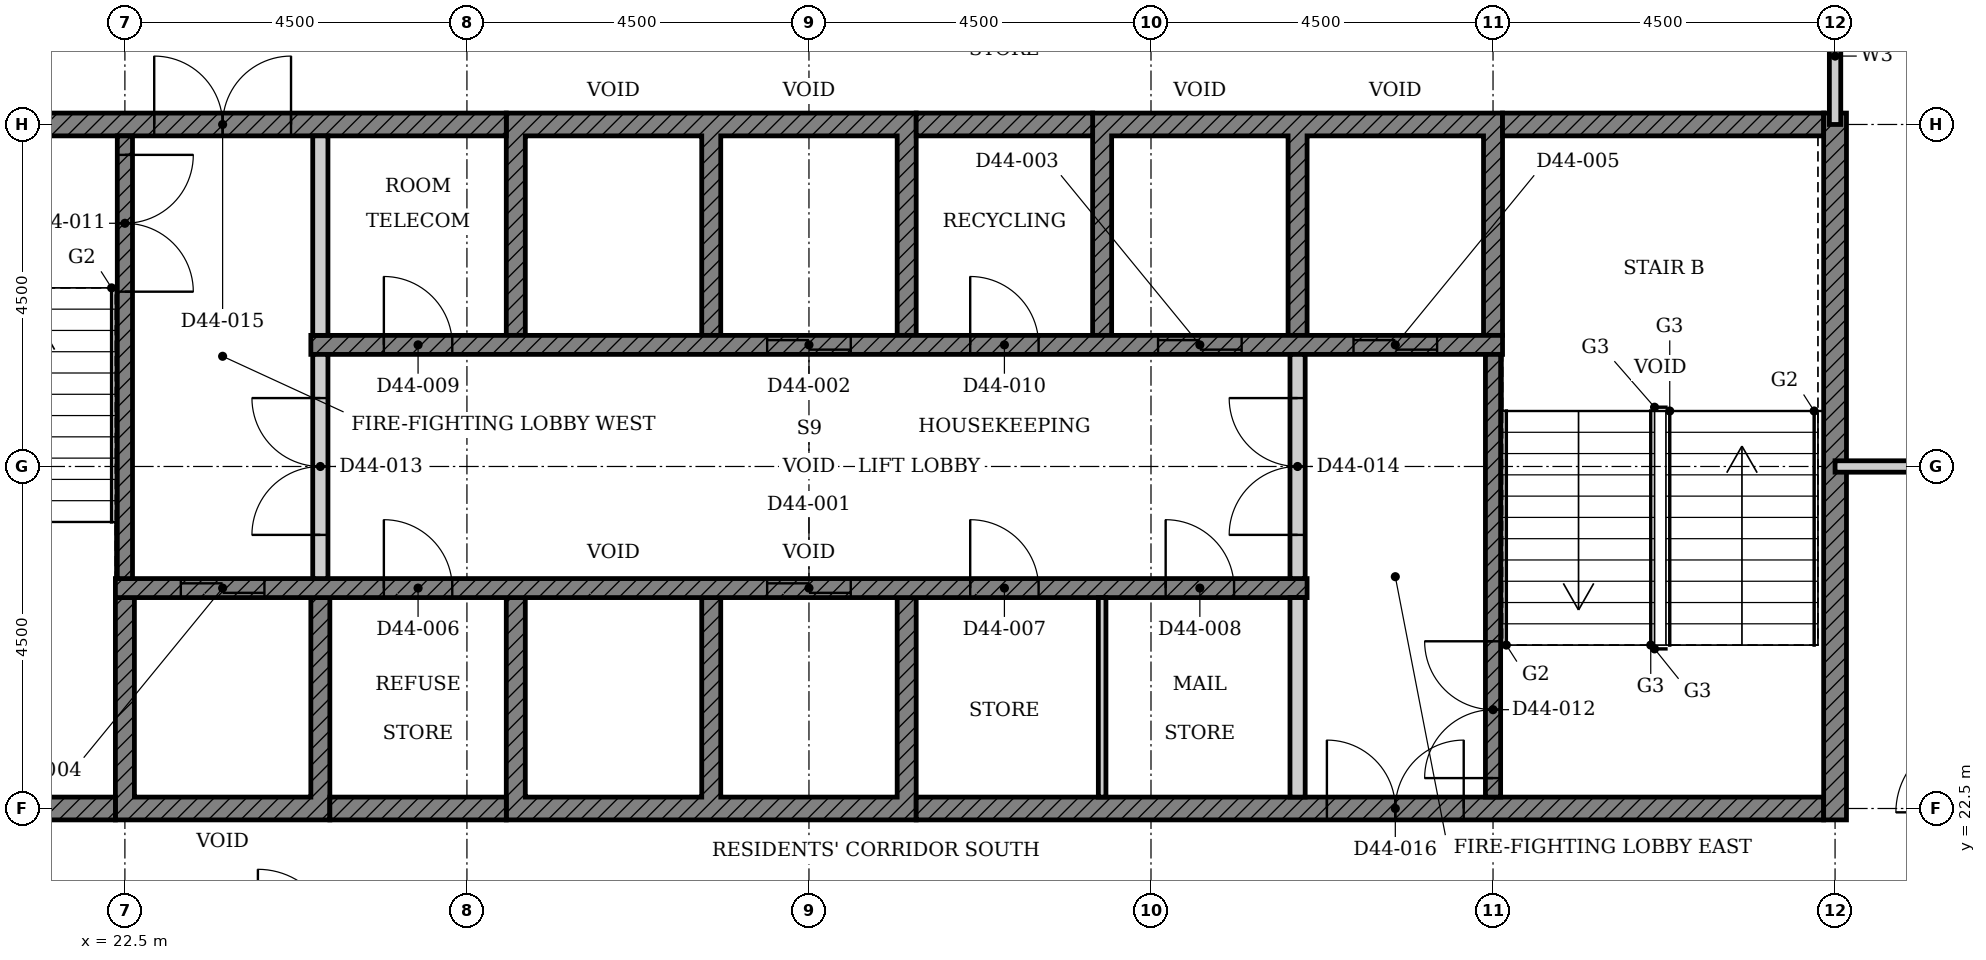
"""IFC4 building model, lengths in metres.
Left out: names, types, materials, properties, quantities, classifications, styles, units other than length and angle.
Written with IfcOpenShell. Run it as: python <this file> out.ifc"""

import sys

from ifc_helpers import new_model, si_unit, direction, frame, frame_2d, origin, place, context, subcontext, project, spatial, polyline, rectangle, outline, extrude, element, fill, save


model = new_model("IFC4")
c1 = context("Model", 3, precision=1e-05, world=origin(), true_north=direction((0.0, 1.0)))
c2 = subcontext(c1, "Body", "Model", "MODEL_VIEW")
j1 = project(units=[si_unit("LENGTHUNIT", "METRE"), si_unit("PLANEANGLEUNIT", "RADIAN")], contexts=[c1])
p1 = place(None, origin())
s1 = spatial("IfcSite", under=j1, at=p1, CompositionType="ELEMENT")
p2 = place(p1, origin())
s2 = spatial("IfcBuilding", under=s1, at=p2, CompositionType="ELEMENT")
p3 = place(p2, frame((0.0, 0.0, 176.5)))
s3 = spatial("IfcBuildingStorey", under=s2, at=p3, CompositionType="ELEMENT", Elevation=176.5)
p4 = place(p3, origin())
e1 = element("IfcWall", 1, at=p4, inside=s3, PredefinedType="SHEAR", context=c2, shape_type="SweptSolid", body=[
    extrude(outline(polyline([(22.375, 22.35), (25.197, 22.35), (25.197, 25.275), (24.947, 25.275), (24.947, 22.65), (22.625, 22.65), (22.625, 25.275), (22.375, 25.275), (22.375, 22.35)])), origin(), (0.0, 0.0, 1.0), 3.4),
])
p5 = place(p3, origin())
e2 = element("IfcWall", 2, at=p5, inside=s3, PredefinedType="SHEAR", context=c2, shape_type="SweptSolid", body=[
    extrude(outline(polyline([(27.518, 22.35), (32.911, 22.35), (32.911, 25.275), (32.661, 25.275), (32.661, 22.65), (30.339, 22.65), (30.339, 25.275), (30.089, 25.275), (30.089, 22.65), (27.768, 22.65), (27.768, 25.275), (27.518, 25.275), (27.518, 22.35)])), origin(), (0.0, 0.0, 1.0), 3.4),
])
p6 = place(p3, origin())
e3 = element("IfcWall", 3, at=p6, inside=s3, PredefinedType="SHEAR", context=c2, shape_type="SweptSolid", body=[
    extrude(outline(polyline([(27.518, 28.725), (27.768, 28.725), (27.768, 31.35), (30.089, 31.35), (30.089, 28.725), (30.339, 28.725), (30.339, 31.35), (32.661, 31.35), (32.661, 28.725), (32.911, 28.725), (32.911, 31.65), (27.518, 31.65), (27.518, 28.725)])), origin(), (0.0, 0.0, 1.0), 3.4),
])
p7 = place(p3, origin())
e4 = element("IfcWall", 4, at=p7, inside=s3, PredefinedType="SHEAR", context=c2, shape_type="SweptSolid", body=[
    extrude(outline(polyline([(35.232, 28.725), (35.482, 28.725), (35.482, 31.35), (37.803, 31.35), (37.803, 28.725), (38.053, 28.725), (38.053, 31.35), (40.375, 31.35), (40.375, 28.725), (40.625, 28.725), (40.625, 31.65), (35.232, 31.65), (35.232, 28.725)])), origin(), (0.0, 0.0, 1.0), 3.4),
])
p8 = place(p3, frame((18.15, 22.5, 0.0), z_axis=(0.0, 0.0, 1.0), x_axis=(1.0, 0.0, 0.0)))
e5 = element("IfcWall", 5, at=p8, inside=s3, PredefinedType="SHEAR", context=c2, shape_type="SweptSolid", body=[
    extrude(rectangle(XDim=4.225, YDim=0.3, at=frame_2d((2.113, 0.0))), origin(), (0.0, 0.0, 1.0), 3.4),
])
p9 = place(p3, frame((25.197, 22.5, 0.0), z_axis=(0.0, 0.0, 1.0), x_axis=(1.0, 0.0, 0.0)))
e6 = element("IfcWall", 6, at=p9, inside=s3, PredefinedType="SHEAR", context=c2, shape_type="SweptSolid", body=[
    extrude(rectangle(XDim=2.321, YDim=0.3, at=frame_2d((1.161, 0.0))), origin(), (0.0, 0.0, 1.0), 3.4),
])
p10 = place(p3, frame((32.911, 22.5, 0.0), z_axis=(0.0, 0.0, 1.0), x_axis=(1.0, 0.0, 0.0)))
e7 = element("IfcWall", 7, at=p10, inside=s3, PredefinedType="SHEAR", context=c2, shape_type="SweptSolid", body=[
    extrude(rectangle(XDim=11.939, YDim=0.3, at=frame_2d((5.97, 0.0))), origin(), (0.0, 0.0, 1.0), 3.4),
])
p11 = place(p10, frame((5.404, 0.0, 0.0)))
e8 = element("IfcOpeningElement", 8, at=p11, cuts=e7, PredefinedType="OPENING", context=c2, shape_type="SweptSolid", body=[
    extrude(rectangle(XDim=1.8, YDim=2.1, at=frame_2d((0.9, 1.05))), frame((0.0, 0.16, 0.0), z_axis=(0.0, -1.0, 0.0), x_axis=(1.0, 0.0, 0.0)), (0.0, 0.0, 1.0), 0.32),
])
p12 = place(p3, frame((18.15, 31.5, 0.0), z_axis=(0.0, 0.0, 1.0), x_axis=(1.0, 0.0, 0.0)))
e9 = element("IfcWall", 9, at=p12, inside=s3, PredefinedType="SHEAR", context=c2, shape_type="SweptSolid", body=[
    extrude(rectangle(XDim=9.368, YDim=0.3, at=frame_2d((4.684, 0.0))), origin(), (0.0, 0.0, 1.0), 3.4),
])
p13 = place(p12, frame((4.736, 0.0, 0.0)))
e10 = element("IfcOpeningElement", 10, at=p13, cuts=e9, PredefinedType="OPENING", context=c2, shape_type="SweptSolid", body=[
    extrude(rectangle(XDim=1.8, YDim=2.1, at=frame_2d((0.9, 1.05))), frame((0.0, 0.16, 0.0), z_axis=(0.0, -1.0, 0.0), x_axis=(1.0, 0.0, 0.0)), (0.0, 0.0, 1.0), 0.32),
])
p14 = place(p3, frame((32.911, 31.5, 0.0), z_axis=(0.0, 0.0, 1.0), x_axis=(1.0, 0.0, 0.0)))
e11 = element("IfcWall", 11, at=p14, inside=s3, PredefinedType="SHEAR", context=c2, shape_type="SweptSolid", body=[
    extrude(rectangle(XDim=2.322, YDim=0.3, at=frame_2d((1.161, 0.0))), origin(), (0.0, 0.0, 1.0), 3.4),
])
p15 = place(p3, frame((40.625, 31.5, 0.0), z_axis=(0.0, 0.0, 1.0), x_axis=(1.0, 0.0, 0.0)))
e12 = element("IfcWall", 12, at=p15, inside=s3, PredefinedType="SHEAR", context=c2, shape_type="SweptSolid", body=[
    extrude(rectangle(XDim=4.225, YDim=0.3, at=frame_2d((2.113, 0.0))), origin(), (0.0, 0.0, 1.0), 3.4),
])
p16 = place(p3, frame((45.0, 22.35, 0.0), z_axis=(0.0, 0.0, 1.0), x_axis=(0.0, 1.0, 0.0)))
e13 = element("IfcWall", 13, at=p16, inside=s3, PredefinedType="SHEAR", context=c2, shape_type="SweptSolid", body=[
    extrude(rectangle(XDim=9.3, YDim=0.3, at=frame_2d((4.65, 0.0))), origin(), (0.0, 0.0, 1.0), 3.4),
])
p17 = place(p3, frame((22.375, 25.4, 0.0), z_axis=(0.0, 0.0, 1.0), x_axis=(1.0, 0.0, 0.0)))
e14 = element("IfcWall", 14, at=p17, inside=s3, PredefinedType="SHEAR", context=c2, shape_type="SweptSolid", body=[
    extrude(rectangle(XDim=15.678, YDim=0.25, at=frame_2d((7.839, 0.0))), origin(), (0.0, 0.0, 1.0), 3.4),
])
p18 = place(p17, frame((8.575, 0.0, 0.0)))
e15 = element("IfcOpeningElement", 15, at=p18, cuts=e14, PredefinedType="OPENING", context=c2, shape_type="SweptSolid", body=[
    extrude(rectangle(XDim=1.1, YDim=2.1, at=frame_2d((0.55, 1.05))), frame((0.0, 0.135, 0.0), z_axis=(0.0, -1.0, 0.0), x_axis=(1.0, 0.0, 0.0)), (0.0, 0.0, 1.0), 0.27),
])
p19 = place(p17, frame((0.861, 0.0, 0.0)))
e16 = element("IfcOpeningElement", 16, at=p19, cuts=e14, PredefinedType="OPENING", context=c2, shape_type="SweptSolid", body=[
    extrude(rectangle(XDim=1.1, YDim=2.1, at=frame_2d((0.55, 1.05))), frame((0.0, 0.135, 0.0), z_axis=(0.0, -1.0, 0.0), x_axis=(1.0, 0.0, 0.0)), (0.0, 0.0, 1.0), 0.27),
])
p20 = place(p17, frame((3.532, 0.0, 0.0)))
e17 = element("IfcOpeningElement", 17, at=p20, cuts=e14, PredefinedType="OPENING", context=c2, shape_type="SweptSolid", body=[
    extrude(rectangle(XDim=0.9, YDim=2.1, at=frame_2d((0.45, 1.05))), frame((0.0, 0.135, 0.0), z_axis=(0.0, -1.0, 0.0), x_axis=(1.0, 0.0, 0.0)), (0.0, 0.0, 1.0), 0.27),
])
p21 = place(p17, frame((11.246, 0.0, 0.0)))
e18 = element("IfcOpeningElement", 18, at=p21, cuts=e14, PredefinedType="OPENING", context=c2, shape_type="SweptSolid", body=[
    extrude(rectangle(XDim=0.9, YDim=2.1, at=frame_2d((0.45, 1.05))), frame((0.0, 0.135, 0.0), z_axis=(0.0, -1.0, 0.0), x_axis=(1.0, 0.0, 0.0)), (0.0, 0.0, 1.0), 0.27),
])
p22 = place(p17, frame((13.818, 0.0, 0.0)))
e19 = element("IfcOpeningElement", 19, at=p22, cuts=e14, PredefinedType="OPENING", context=c2, shape_type="SweptSolid", body=[
    extrude(rectangle(XDim=0.9, YDim=2.1, at=frame_2d((0.45, 1.05))), frame((0.0, 0.135, 0.0), z_axis=(0.0, -1.0, 0.0), x_axis=(1.0, 0.0, 0.0)), (0.0, 0.0, 1.0), 0.27),
])
p23 = place(p3, frame((24.947, 28.6, 0.0), z_axis=(0.0, 0.0, 1.0), x_axis=(1.0, 0.0, 0.0)))
e20 = element("IfcWall", 20, at=p23, inside=s3, PredefinedType="SHEAR", context=c2, shape_type="SweptSolid", body=[
    extrude(rectangle(XDim=15.678, YDim=0.25, at=frame_2d((7.839, 0.0))), origin(), (0.0, 0.0, 1.0), 3.4),
])
p24 = place(p23, frame((6.004, 0.0, 0.0)))
e21 = element("IfcOpeningElement", 21, at=p24, cuts=e20, PredefinedType="OPENING", context=c2, shape_type="SweptSolid", body=[
    extrude(rectangle(XDim=1.1, YDim=2.1, at=frame_2d((0.55, 1.05))), frame((0.0, 0.135, 0.0), z_axis=(0.0, -1.0, 0.0), x_axis=(1.0, 0.0, 0.0)), (0.0, 0.0, 1.0), 0.27),
])
p25 = place(p23, frame((11.146, 0.0, 0.0)))
e22 = element("IfcOpeningElement", 22, at=p25, cuts=e20, PredefinedType="OPENING", context=c2, shape_type="SweptSolid", body=[
    extrude(rectangle(XDim=1.1, YDim=2.1, at=frame_2d((0.55, 1.05))), frame((0.0, 0.135, 0.0), z_axis=(0.0, -1.0, 0.0), x_axis=(1.0, 0.0, 0.0)), (0.0, 0.0, 1.0), 0.27),
])
p26 = place(p23, frame((13.718, 0.0, 0.0)))
e23 = element("IfcOpeningElement", 23, at=p26, cuts=e20, PredefinedType="OPENING", context=c2, shape_type="SweptSolid", body=[
    extrude(rectangle(XDim=1.1, YDim=2.1, at=frame_2d((0.55, 1.05))), frame((0.0, 0.135, 0.0), z_axis=(0.0, -1.0, 0.0), x_axis=(1.0, 0.0, 0.0)), (0.0, 0.0, 1.0), 0.27),
])
p27 = place(p23, frame((0.961, 0.0, 0.0)))
e24 = element("IfcOpeningElement", 24, at=p27, cuts=e20, PredefinedType="OPENING", context=c2, shape_type="SweptSolid", body=[
    extrude(rectangle(XDim=0.9, YDim=2.1, at=frame_2d((0.45, 1.05))), frame((0.0, 0.135, 0.0), z_axis=(0.0, -1.0, 0.0), x_axis=(1.0, 0.0, 0.0)), (0.0, 0.0, 1.0), 0.27),
])
p28 = place(p23, frame((8.675, 0.0, 0.0)))
e25 = element("IfcOpeningElement", 25, at=p28, cuts=e20, PredefinedType="OPENING", context=c2, shape_type="SweptSolid", body=[
    extrude(rectangle(XDim=0.9, YDim=2.1, at=frame_2d((0.45, 1.05))), frame((0.0, 0.135, 0.0), z_axis=(0.0, -1.0, 0.0), x_axis=(1.0, 0.0, 0.0)), (0.0, 0.0, 1.0), 0.27),
])
p29 = place(p3, frame((37.928, 22.65, 0.0), z_axis=(0.0, 0.0, 1.0), x_axis=(0.0, 1.0, 0.0)))
e26 = element("IfcWall", 26, at=p29, inside=s3, PredefinedType="PARTITIONING", context=c2, shape_type="SweptSolid", body=[
    extrude(rectangle(XDim=2.625, YDim=0.2, at=frame_2d((1.312, 0.0))), origin(), (0.0, 0.0, 1.0), 3.4),
])
p30 = place(p3, frame((35.357, 22.65, 0.0), z_axis=(0.0, 0.0, 1.0), x_axis=(0.0, 1.0, 0.0)))
e27 = element("IfcWall", 27, at=p30, inside=s3, PredefinedType="PARTITIONING", context=c2, shape_type="SweptSolid", body=[
    extrude(rectangle(XDim=2.625, YDim=0.1, at=frame_2d((1.312, 0.0))), origin(), (0.0, 0.0, 1.0), 3.4),
])
p31 = place(p3, frame((25.072, 28.725, 0.0), z_axis=(0.0, 0.0, 1.0), x_axis=(0.0, 1.0, 0.0)))
e28 = element("IfcWall", 28, at=p31, inside=s3, PredefinedType="PARTITIONING", context=c2, shape_type="SweptSolid", body=[
    extrude(rectangle(XDim=2.625, YDim=0.2, at=frame_2d((1.312, 0.0))), origin(), (0.0, 0.0, 1.0), 3.4),
])
p32 = place(p3, frame((22.5, 31.35, 0.0), z_axis=(0.0, 0.0, 1.0), x_axis=(0.0, -1.0, 0.0)))
e29 = element("IfcWall", 29, at=p32, inside=s3, PredefinedType="SHEAR", context=c2, shape_type="SweptSolid", body=[
    extrude(rectangle(XDim=5.825, YDim=0.2, at=frame_2d((2.913, 0.0))), origin(), (0.0, 0.0, 1.0), 3.4),
])
p33 = place(p32, frame((0.25, 0.0, 0.0)))
e30 = element("IfcOpeningElement", 30, at=p33, cuts=e29, PredefinedType="OPENING", context=c2, shape_type="SweptSolid", body=[
    extrude(rectangle(XDim=1.8, YDim=2.1, at=frame_2d((0.9, 1.05))), frame((0.0, 0.11, 0.0), z_axis=(0.0, -1.0, 0.0), x_axis=(1.0, 0.0, 0.0)), (0.0, 0.0, 1.0), 0.22),
])
p34 = place(p3, frame((40.5, 22.65, 0.0), z_axis=(0.0, 0.0, 1.0), x_axis=(0.0, 1.0, 0.0)))
e31 = element("IfcWall", 31, at=p34, inside=s3, PredefinedType="SHEAR", context=c2, shape_type="SweptSolid", body=[
    extrude(rectangle(XDim=5.825, YDim=0.2, at=frame_2d((2.913, 0.0))), origin(), (0.0, 0.0, 1.0), 3.4),
])
p35 = place(p34, frame((0.25, 0.0, 0.0)))
e32 = element("IfcOpeningElement", 32, at=p35, cuts=e31, PredefinedType="OPENING", context=c2, shape_type="SweptSolid", body=[
    extrude(rectangle(XDim=1.8, YDim=2.1, at=frame_2d((0.9, 1.05))), frame((0.0, 0.11, 0.0), z_axis=(0.0, -1.0, 0.0), x_axis=(1.0, 0.0, 0.0)), (0.0, 0.0, 1.0), 0.22),
])
p36 = place(p3, frame((25.072, 25.525, 0.0), z_axis=(0.0, 0.0, 1.0), x_axis=(0.0, 1.0, 0.0)))
e33 = element("IfcWall", 33, at=p36, inside=s3, PredefinedType="PARTITIONING", context=c2, shape_type="SweptSolid", body=[
    extrude(rectangle(XDim=2.95, YDim=0.2, at=frame_2d((1.475, 0.0))), origin(), (0.0, 0.0, 1.0), 3.4),
])
p37 = place(p36, frame((0.575, 0.0, 0.0)))
e34 = element("IfcOpeningElement", 34, at=p37, cuts=e33, PredefinedType="OPENING", context=c2, shape_type="SweptSolid", body=[
    extrude(rectangle(XDim=1.8, YDim=2.1, at=frame_2d((0.9, 1.05))), frame((0.0, 0.11, 0.0), z_axis=(0.0, -1.0, 0.0), x_axis=(1.0, 0.0, 0.0)), (0.0, 0.0, 1.0), 0.22),
])
p38 = place(p3, frame((37.928, 25.525, 0.0), z_axis=(0.0, 0.0, 1.0), x_axis=(0.0, 1.0, 0.0)))
e35 = element("IfcWall", 35, at=p38, inside=s3, PredefinedType="PARTITIONING", context=c2, shape_type="SweptSolid", body=[
    extrude(rectangle(XDim=2.95, YDim=0.2, at=frame_2d((1.475, 0.0))), origin(), (0.0, 0.0, 1.0), 3.4),
])
p39 = place(p38, frame((0.575, 0.0, 0.0)))
e36 = element("IfcOpeningElement", 36, at=p39, cuts=e35, PredefinedType="OPENING", context=c2, shape_type="SweptSolid", body=[
    extrude(rectangle(XDim=1.8, YDim=2.1, at=frame_2d((0.9, 1.05))), frame((0.0, 0.11, 0.0), z_axis=(0.0, -1.0, 0.0), x_axis=(1.0, 0.0, 0.0)), (0.0, 0.0, 1.0), 0.22),
])
p40 = place(p3, frame((45.0, 27.0, 0.0), z_axis=(0.0, 0.0, 1.0), x_axis=(1.0, 0.0, 0.0)))
e37 = element("IfcWall", 37, at=p40, inside=s3, PredefinedType="PARTITIONING", context=c2, shape_type="SweptSolid", body=[
    extrude(rectangle(XDim=13.5, YDim=0.15, at=frame_2d((6.75, 0.0))), origin(), (0.0, 0.0, 1.0), 2.68),
])
p41 = place(p40, frame((7.15, 0.0, 0.0)))
e38 = element("IfcOpeningElement", 38, at=p41, cuts=e37, PredefinedType="OPENING", context=c2, shape_type="SweptSolid", body=[
    extrude(rectangle(XDim=1.0, YDim=2.1, at=frame_2d((0.5, 1.05))), frame((0.0, 0.085, 0.0), z_axis=(0.0, -1.0, 0.0), x_axis=(1.0, 0.0, 0.0)), (0.0, 0.0, 1.0), 0.17),
])
p42 = place(p3, frame((45.0, 31.5, 0.0), z_axis=(0.0, 0.0, 1.0), x_axis=(0.0, 1.0, 0.0)))
e39 = element("IfcWall", 39, at=p42, inside=s3, PredefinedType="PARTITIONING", context=c2, shape_type="SweptSolid", body=[
    extrude(rectangle(XDim=1.8, YDim=0.15, at=frame_2d((0.9, 0.0))), origin(), (0.0, 0.0, 1.0), 3.4),
])
p43 = place(p18, origin())
e40 = element("IfcDoor", 40, at=p43, inside=s3, OperationType="DOUBLE_DOOR_SLIDING", PredefinedType="DOOR", context=c2, shape_type="SweptSolid", body=[
    extrude(rectangle(XDim=1.1, YDim=2.1, at=frame_2d((0.55, 1.05))), frame((0.0, 0.025, 0.0), z_axis=(0.0, -1.0, 0.0), x_axis=(1.0, 0.0, 0.0)), (0.0, 0.0, 1.0), 0.05),
])
fill(e15, e40)
p44 = place(p24, origin())
e41 = element("IfcDoor", 41, at=p44, inside=s3, OperationType="DOUBLE_DOOR_SLIDING", PredefinedType="DOOR", context=c2, shape_type="SweptSolid", body=[
    extrude(rectangle(XDim=1.1, YDim=2.1, at=frame_2d((0.55, 1.05))), frame((0.0, 0.025, 0.0), z_axis=(0.0, -1.0, 0.0), x_axis=(1.0, 0.0, 0.0)), (0.0, 0.0, 1.0), 0.05),
])
fill(e21, e41)
p45 = place(p25, origin())
e42 = element("IfcDoor", 42, at=p45, inside=s3, OperationType="DOUBLE_DOOR_SLIDING", PredefinedType="DOOR", context=c2, shape_type="SweptSolid", body=[
    extrude(rectangle(XDim=1.1, YDim=2.1, at=frame_2d((0.55, 1.05))), frame((0.0, 0.025, 0.0), z_axis=(0.0, -1.0, 0.0), x_axis=(1.0, 0.0, 0.0)), (0.0, 0.0, 1.0), 0.05),
])
fill(e22, e42)
p46 = place(p19, origin())
e43 = element("IfcDoor", 43, at=p46, inside=s3, OperationType="DOUBLE_DOOR_SLIDING", PredefinedType="DOOR", context=c2, shape_type="SweptSolid", body=[
    extrude(rectangle(XDim=1.1, YDim=2.1, at=frame_2d((0.55, 1.05))), frame((0.0, 0.025, 0.0), z_axis=(0.0, -1.0, 0.0), x_axis=(1.0, 0.0, 0.0)), (0.0, 0.0, 1.0), 0.05),
])
fill(e16, e43)
p47 = place(p26, origin())
e44 = element("IfcDoor", 44, at=p47, inside=s3, OperationType="DOUBLE_DOOR_SLIDING", PredefinedType="DOOR", context=c2, shape_type="SweptSolid", body=[
    extrude(rectangle(XDim=1.1, YDim=2.1, at=frame_2d((0.55, 1.05))), frame((0.0, 0.025, 0.0), z_axis=(0.0, -1.0, 0.0), x_axis=(1.0, 0.0, 0.0)), (0.0, 0.0, 1.0), 0.05),
])
fill(e23, e44)
p48 = place(p20, origin())
e45 = element("IfcDoor", 45, at=p48, inside=s3, OperationType="SINGLE_SWING_LEFT", PredefinedType="DOOR", context=c2, shape_type="SweptSolid", body=[
    extrude(rectangle(XDim=0.9, YDim=2.1, at=frame_2d((0.45, 1.05))), frame((0.0, 0.025, 0.0), z_axis=(0.0, -1.0, 0.0), x_axis=(1.0, 0.0, 0.0)), (0.0, 0.0, 1.0), 0.05),
])
fill(e17, e45)
p49 = place(p21, origin())
e46 = element("IfcDoor", 46, at=p49, inside=s3, OperationType="SINGLE_SWING_LEFT", PredefinedType="DOOR", context=c2, shape_type="SweptSolid", body=[
    extrude(rectangle(XDim=0.9, YDim=2.1, at=frame_2d((0.45, 1.05))), frame((0.0, 0.025, 0.0), z_axis=(0.0, -1.0, 0.0), x_axis=(1.0, 0.0, 0.0)), (0.0, 0.0, 1.0), 0.05),
])
fill(e18, e46)
p50 = place(p22, origin())
e47 = element("IfcDoor", 47, at=p50, inside=s3, OperationType="SINGLE_SWING_LEFT", PredefinedType="DOOR", context=c2, shape_type="SweptSolid", body=[
    extrude(rectangle(XDim=0.9, YDim=2.1, at=frame_2d((0.45, 1.05))), frame((0.0, 0.025, 0.0), z_axis=(0.0, -1.0, 0.0), x_axis=(1.0, 0.0, 0.0)), (0.0, 0.0, 1.0), 0.05),
])
fill(e19, e47)
p51 = place(p27, origin())
e48 = element("IfcDoor", 48, at=p51, inside=s3, OperationType="SINGLE_SWING_LEFT", PredefinedType="DOOR", context=c2, shape_type="SweptSolid", body=[
    extrude(rectangle(XDim=0.9, YDim=2.1, at=frame_2d((0.45, 1.05))), frame((0.0, 0.025, 0.0), z_axis=(0.0, -1.0, 0.0), x_axis=(1.0, 0.0, 0.0)), (0.0, 0.0, 1.0), 0.05),
])
fill(e24, e48)
p52 = place(p28, origin())
e49 = element("IfcDoor", 49, at=p52, inside=s3, OperationType="SINGLE_SWING_LEFT", PredefinedType="DOOR", context=c2, shape_type="SweptSolid", body=[
    extrude(rectangle(XDim=0.9, YDim=2.1, at=frame_2d((0.45, 1.05))), frame((0.0, 0.025, 0.0), z_axis=(0.0, -1.0, 0.0), x_axis=(1.0, 0.0, 0.0)), (0.0, 0.0, 1.0), 0.05),
])
fill(e25, e49)
p53 = place(p33, origin())
e50 = element("IfcDoor", 50, at=p53, inside=s3, OperationType="DOUBLE_DOOR_SINGLE_SWING", PredefinedType="DOOR", context=c2, shape_type="SweptSolid", body=[
    extrude(rectangle(XDim=1.8, YDim=2.1, at=frame_2d((0.9, 1.05))), frame((0.0, 0.025, 0.0), z_axis=(0.0, -1.0, 0.0), x_axis=(1.0, 0.0, 0.0)), (0.0, 0.0, 1.0), 0.05),
])
fill(e30, e50)
p54 = place(p35, origin())
e51 = element("IfcDoor", 51, at=p54, inside=s3, OperationType="DOUBLE_DOOR_SINGLE_SWING", PredefinedType="DOOR", context=c2, shape_type="SweptSolid", body=[
    extrude(rectangle(XDim=1.8, YDim=2.1, at=frame_2d((0.9, 1.05))), frame((0.0, 0.025, 0.0), z_axis=(0.0, -1.0, 0.0), x_axis=(1.0, 0.0, 0.0)), (0.0, 0.0, 1.0), 0.05),
])
fill(e32, e51)
p55 = place(p37, origin())
e52 = element("IfcDoor", 52, at=p55, inside=s3, OperationType="DOUBLE_DOOR_SINGLE_SWING", PredefinedType="DOOR", context=c2, shape_type="SweptSolid", body=[
    extrude(rectangle(XDim=1.8, YDim=2.1, at=frame_2d((0.9, 1.05))), frame((0.0, 0.025, 0.0), z_axis=(0.0, -1.0, 0.0), x_axis=(1.0, 0.0, 0.0)), (0.0, 0.0, 1.0), 0.05),
])
fill(e34, e52)
p56 = place(p39, origin())
e53 = element("IfcDoor", 53, at=p56, inside=s3, OperationType="DOUBLE_DOOR_SINGLE_SWING", PredefinedType="DOOR", context=c2, shape_type="SweptSolid", body=[
    extrude(rectangle(XDim=1.8, YDim=2.1, at=frame_2d((0.9, 1.05))), frame((0.0, 0.025, 0.0), z_axis=(0.0, -1.0, 0.0), x_axis=(1.0, 0.0, 0.0)), (0.0, 0.0, 1.0), 0.05),
])
fill(e36, e53)
p57 = place(p13, origin())
e54 = element("IfcDoor", 54, at=p57, inside=s3, OperationType="DOUBLE_DOOR_SINGLE_SWING", PredefinedType="DOOR", context=c2, shape_type="SweptSolid", body=[
    extrude(rectangle(XDim=1.8, YDim=2.1, at=frame_2d((0.9, 1.05))), frame((0.0, 0.025, 0.0), z_axis=(0.0, -1.0, 0.0), x_axis=(1.0, 0.0, 0.0)), (0.0, 0.0, 1.0), 0.05),
])
fill(e10, e54)
p58 = place(p11, origin())
e55 = element("IfcDoor", 55, at=p58, inside=s3, OperationType="DOUBLE_DOOR_SINGLE_SWING", PredefinedType="DOOR", context=c2, shape_type="SweptSolid", body=[
    extrude(rectangle(XDim=1.8, YDim=2.1, at=frame_2d((0.9, 1.05))), frame((0.0, 0.025, 0.0), z_axis=(0.0, -1.0, 0.0), x_axis=(1.0, 0.0, 0.0)), (0.0, 0.0, 1.0), 0.05),
])
fill(e8, e55)
save(model, sys.argv[1])
